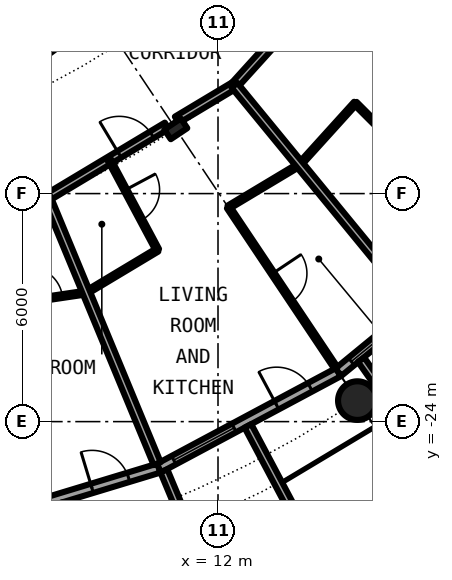
"""IFC4 building model, lengths in metres.
Left out: names, types, materials, properties, quantities, classifications, styles, units other than length and angle.
Written with IfcOpenShell. Run it as: python <this file> out.ifc"""

import sys

from ifc_helpers import new_model, si_unit, direction, frame, frame_2d, origin, origin_2d, place, context, subcontext, project, spatial, rectangle, hollow_circle, i_section, extrude, element, fill, save


model = new_model("IFC4")
c1 = context("Model", 3, precision=1e-05, world=origin(), true_north=direction((0.0, 1.0)))
c2 = subcontext(c1, "Body", "Model", "MODEL_VIEW")
j1 = project(units=[si_unit("LENGTHUNIT", "METRE"), si_unit("PLANEANGLEUNIT", "RADIAN")], contexts=[c1])
p1 = place(None, origin())
s1 = spatial("IfcSite", under=j1, at=p1, CompositionType="ELEMENT")
p2 = place(p1, origin())
s2 = spatial("IfcBuilding", under=s1, at=p2, CompositionType="ELEMENT")
p3 = place(p2, frame((0.0, 0.0, 75.8)))
s3 = spatial("IfcBuildingStorey", under=s2, at=p3, CompositionType="ELEMENT", Elevation=75.8)
p4 = place(p3, frame((15.667, -23.448, 0.0), z_axis=(0.0, 0.0, 1.0), x_axis=(1.0, 0.0, 0.0)))
e1 = element("IfcColumn", 1, at=p4, inside=s3, PredefinedType="COLUMN", context=c2, shape_type="SweptSolid", body=[
    extrude(hollow_circle(Radius=0.508, WallThickness=0.04, at=origin_2d()), origin(), (0.0, 0.0, 1.0), 3.05),
])
p5 = place(p3, frame((10.889, -16.297, 0.0), z_axis=(0.0, 0.0, 1.0), x_axis=(0.55557023302, -0.831469612303, 0.0)))
e2 = element("IfcColumn", 2, at=p5, inside=s3, PredefinedType="COLUMN", context=c2, shape_type="SweptSolid", body=[
    extrude(i_section(OverallWidth=0.306, OverallDepth=0.524, WebThickness=0.021, FlangeThickness=0.04, FilletRadius=0.027, at=origin_2d()), origin(), (0.0, 0.0, 1.0), 3.05),
])
p6 = place(p3, frame((5.326, -26.775, 0.0), z_axis=(0.0, 0.0, 1.0), x_axis=(0.956965678721, 0.290201119486, 0.0)))
e3 = element("IfcWall", 3, at=p6, inside=s3, PredefinedType="SOLIDWALL", context=c2, shape_type="SweptSolid", body=[
    extrude(rectangle(XDim=5.351, YDim=0.25, at=frame_2d((2.676, 0.0))), origin(), (0.0, 0.0, 1.0), 2.7),
])
p7 = place(p6, frame((0.441, 0.0, 0.3)))
e4 = element("IfcOpeningElement", 4, at=p7, cuts=e3, PredefinedType="OPENING", context=c2, shape_type="SweptSolid", body=[
    extrude(rectangle(XDim=1.8, YDim=2.1, at=frame_2d((0.9, 1.05))), frame((0.0, 0.135, 0.0), z_axis=(0.0, -1.0, 0.0), x_axis=(1.0, 0.0, 0.0)), (0.0, 0.0, 1.0), 0.27),
])
p8 = place(p6, frame((3.51, 0.0, 0.0)))
e5 = element("IfcOpeningElement", 5, at=p8, cuts=e3, PredefinedType="OPENING", context=c2, shape_type="SweptSolid", body=[
    extrude(rectangle(XDim=1.0, YDim=2.2, at=frame_2d((0.5, 1.1))), frame((0.0, 0.135, 0.0), z_axis=(0.0, -1.0, 0.0), x_axis=(1.0, 0.0, 0.0)), (0.0, 0.0, 1.0), 0.27),
])
p9 = place(p3, frame((10.447, -25.222, 0.0), z_axis=(0.0, 0.0, 1.0), x_axis=(0.881915646801, 0.471407246368, 0.0)))
e6 = element("IfcWall", 6, at=p9, inside=s3, PredefinedType="SOLIDWALL", context=c2, shape_type="SweptSolid", body=[
    extrude(rectangle(XDim=5.352, YDim=0.25, at=frame_2d((2.676, 0.0))), origin(), (0.0, 0.0, 1.0), 2.7),
])
p10 = place(p9, frame((0.441, 0.0, 0.3)))
e7 = element("IfcOpeningElement", 7, at=p10, cuts=e6, PredefinedType="OPENING", context=c2, shape_type="SweptSolid", body=[
    extrude(rectangle(XDim=1.8, YDim=2.1, at=frame_2d((0.9, 1.05))), frame((0.0, 0.135, 0.0), z_axis=(0.0, -1.0, 0.0), x_axis=(1.0, 0.0, 0.0)), (0.0, 0.0, 1.0), 0.27),
])
p11 = place(p9, frame((3.51, 0.0, 0.0)))
e8 = element("IfcOpeningElement", 8, at=p11, cuts=e6, PredefinedType="OPENING", context=c2, shape_type="SweptSolid", body=[
    extrude(rectangle(XDim=1.0, YDim=2.2, at=frame_2d((0.5, 1.1))), frame((0.0, 0.135, 0.0), z_axis=(0.0, -1.0, 0.0), x_axis=(1.0, 0.0, 0.0)), (0.0, 0.0, 1.0), 0.27),
])
p12 = place(p3, frame((10.575, -25.295, -0.03), z_axis=(0.0, 0.0, 1.0), x_axis=(0.385697364644, -0.922625353492, 0.0)))
e9 = element("IfcWall", 9, at=p12, inside=s3, PredefinedType="SOLIDWALL", context=c2, shape_type="SweptSolid", body=[
    extrude(rectangle(XDim=2.883, YDim=0.2, at=frame_2d((1.442, 0.0))), origin(), (0.0, 0.0, 1.0), 2.73),
])
p13 = place(p3, frame((12.787, -24.113, -0.03), z_axis=(0.0, 0.0, 1.0), x_axis=(0.468365282436, -0.883534924159, 0.0)))
e10 = element("IfcWall", 10, at=p13, inside=s3, PredefinedType="SOLIDWALL", context=c2, shape_type="SweptSolid", body=[
    extrude(rectangle(XDim=3.006, YDim=0.2, at=frame_2d((1.503, 0.0))), origin(), (0.0, 0.0, 1.0), 2.73),
])
p14 = place(p3, frame((15.167, -22.699, 0.0), z_axis=(0.0, 0.0, 1.0), x_axis=(0.773019449054, 0.634382322723, 0.0)))
e11 = element("IfcWall", 11, at=p14, inside=s3, PredefinedType="SOLIDWALL", context=c2, shape_type="SweptSolid", body=[
    extrude(rectangle(XDim=5.352, YDim=0.25, at=frame_2d((2.676, 0.0))), origin(), (0.0, 0.0, 1.0), 2.7),
])
p15 = place(p14, frame((0.441, 0.0, 0.3)))
e12 = element("IfcOpeningElement", 12, at=p15, cuts=e11, PredefinedType="OPENING", context=c2, shape_type="SweptSolid", body=[
    extrude(rectangle(XDim=1.8, YDim=2.1, at=frame_2d((0.9, 1.05))), frame((0.0, 0.135, 0.0), z_axis=(0.0, -1.0, 0.0), x_axis=(1.0, 0.0, 0.0)), (0.0, 0.0, 1.0), 0.27),
])
p16 = place(p14, frame((3.51, 0.0, 0.0)))
e13 = element("IfcOpeningElement", 13, at=p16, cuts=e11, PredefinedType="OPENING", context=c2, shape_type="SweptSolid", body=[
    extrude(rectangle(XDim=1.0, YDim=2.2, at=frame_2d((0.5, 1.1))), frame((0.0, 0.135, 0.0), z_axis=(0.0, -1.0, 0.0), x_axis=(1.0, 0.0, 0.0)), (0.0, 0.0, 1.0), 0.27),
])
p17 = place(p3, frame((15.765, -22.37, -0.03), z_axis=(0.0, 0.0, 1.0), x_axis=(0.576274612209, -0.817256123454, 0.0)))
e14 = element("IfcWall", 14, at=p17, inside=s3, PredefinedType="SOLIDWALL", context=c2, shape_type="SweptSolid", body=[
    extrude(rectangle(XDim=2.933, YDim=0.2, at=frame_2d((1.466, 0.0))), origin(), (0.0, 0.0, 1.0), 2.73),
])
for number, where, z_axis, x_axis in (
    (15, (8.534, -20.604, 0.0), (0.0, 0.0, 1.0), (0.858, 0.514, 0.0)),
    (16, (12.276, -18.36, 0.0), (0.0, 0.0, 1.0), (0.858, 0.514, 0.0)),
):
    element("IfcWall", number, at=place(p3, frame(where, z_axis=z_axis, x_axis=x_axis)), inside=s3, PredefinedType="PARTITIONING", context=c2, shape_type="SweptSolid", body=[
        extrude(rectangle(XDim=2.182, YDim=0.1, at=frame_2d((1.091, 0.0))), origin(), (0.0, 0.0, 1.0), 2.7),
    ])
p18 = place(p3, frame((14.153, -17.234, 0.0), z_axis=(0.0, 0.0, 1.0), x_axis=(0.671144831591, 0.741326254107, 0.0)))
e17 = element("IfcWall", 17, at=p18, inside=s3, PredefinedType="PARTITIONING", context=c2, shape_type="SweptSolid", body=[
    extrude(rectangle(XDim=2.181, YDim=0.1, at=frame_2d((1.091, 0.0))), origin(), (0.0, 0.0, 1.0), 2.7),
])
p19 = place(p3, frame((4.246, -21.239, 0.0), z_axis=(0.0, 0.0, 1.0), x_axis=(0.989178348771, 0.146718077695, 0.0)))
e18 = element("IfcWall", 18, at=p19, inside=s3, PredefinedType="PARTITIONING", context=c2, shape_type="SweptSolid", body=[
    extrude(rectangle(XDim=4.335, YDim=0.1, at=frame_2d((2.167, 0.0))), origin(), (0.0, 0.0, 1.0), 2.7),
])
p20 = place(p19, frame((2.801, 0.0, 0.0)))
e19 = element("IfcOpeningElement", 19, at=p20, cuts=e18, PredefinedType="OPENING", context=c2, shape_type="SweptSolid", body=[
    extrude(rectangle(XDim=0.9, YDim=2.3, at=frame_2d((0.45, 1.15))), frame((0.0, 0.06, 0.0), z_axis=(0.0, -1.0, 0.0), x_axis=(1.0, 0.0, 0.0)), (0.0, 0.0, 1.0), 0.12),
])
p21 = place(p3, frame((7.495, -18.111, 0.0), z_axis=(0.0, 0.0, 1.0), x_axis=(0.857697633371, 0.514154422046, 0.0)))
e20 = element("IfcWall", 20, at=p21, inside=s3, PredefinedType="PARTITIONING", context=c2, shape_type="SweptSolid", body=[
    extrude(rectangle(XDim=3.682, YDim=0.2, at=frame_2d((1.841, 0.0))), origin(), (0.0, 0.0, 1.0), 2.38),
])
p22 = place(p21, frame((2.224, 0.0, 0.0)))
e21 = element("IfcOpeningElement", 21, at=p22, cuts=e20, PredefinedType="OPENING", context=c2, shape_type="SweptSolid", body=[
    extrude(rectangle(XDim=1.0, YDim=2.3, at=frame_2d((0.5, 1.15))), frame((0.0, 0.11, 0.0), z_axis=(0.0, -1.0, 0.0), x_axis=(1.0, 0.0, 0.0)), (0.0, 0.0, 1.0), 0.22),
])
p23 = place(p3, frame((10.916, -16.061, 0.0), z_axis=(0.0, 0.0, 1.0), x_axis=(0.857663265693, 0.514211748875, 0.0)))
e22 = element("IfcWall", 22, at=p23, inside=s3, PredefinedType="PARTITIONING", context=c2, shape_type="SweptSolid", body=[
    extrude(rectangle(XDim=1.77, YDim=0.2, at=frame_2d((0.885, 0.0))), origin(), (0.0, 0.0, 1.0), 2.38),
])
p24 = place(p3, frame((12.434, -15.151, 0.0), z_axis=(0.0, 0.0, 1.0), x_axis=(0.671601747072, 0.740912338492, 0.0)))
e23 = element("IfcWall", 23, at=p24, inside=s3, PredefinedType="PARTITIONING", context=c2, shape_type="SweptSolid", body=[
    extrude(rectangle(XDim=5.597, YDim=0.2, at=frame_2d((2.799, 0.0))), origin(), (0.0, 0.0, 1.0), 2.38),
])
p25 = place(p24, frame((1.417, 0.0, 0.0)))
e24 = element("IfcOpeningElement", 24, at=p25, cuts=e23, PredefinedType="OPENING", context=c2, shape_type="SweptSolid", body=[
    extrude(rectangle(XDim=1.0, YDim=2.3, at=frame_2d((0.5, 1.15))), frame((0.0, 0.11, 0.0), z_axis=(0.0, -1.0, 0.0), x_axis=(1.0, 0.0, 0.0)), (0.0, 0.0, 1.0), 0.22),
])
p26 = place(p3, frame((4.906, -16.172, 0.0), z_axis=(0.0, 0.0, 1.0), x_axis=(0.803191461888, 0.595720971219, 0.0)))
e25 = element("IfcWall", 25, at=p26, inside=s3, PredefinedType="PARTITIONING", context=c2, shape_type="SweptSolid", body=[
    extrude(rectangle(XDim=9.76, YDim=0.2, at=frame_2d((4.88, 0.0))), origin(), (0.0, 0.0, 1.0), 2.7),
])
p27 = place(p26, frame((4.38, 0.0, 0.0)))
e26 = element("IfcOpeningElement", 26, at=p27, cuts=e25, PredefinedType="OPENING", context=c2, shape_type="SweptSolid", body=[
    extrude(rectangle(XDim=1.0, YDim=2.3, at=frame_2d((0.5, 1.15))), frame((0.0, 0.11, 0.0), z_axis=(0.0, -1.0, 0.0), x_axis=(1.0, 0.0, 0.0)), (0.0, 0.0, 1.0), 0.22),
])
p28 = place(p3, frame((7.501, -18.108, 0.0), z_axis=(0.0, 0.0, 1.0), x_axis=(0.382600411313, -0.923913916587, 0.0)))
e27 = element("IfcWall", 27, at=p28, inside=s3, PredefinedType="PARTITIONING", context=c2, shape_type="SweptSolid", body=[
    extrude(rectangle(XDim=7.574, YDim=0.2, at=frame_2d((3.787, 0.0))), origin(), (0.0, 0.0, 1.0), 2.7),
])
p29 = place(p3, frame((9.145, -17.122, 0.0), z_axis=(0.0, 0.0, 1.0), x_axis=(0.471151994359, -0.882052038267, 0.0)))
e28 = element("IfcWall", 28, at=p29, inside=s3, PredefinedType="PARTITIONING", context=c2, shape_type="SweptSolid", body=[
    extrude(rectangle(XDim=2.674, YDim=0.1, at=frame_2d((1.337, 0.0))), origin(), (0.0, 0.0, 1.0), 2.7),
])
p30 = place(p29, frame((0.887, 0.0, 0.0)))
e29 = element("IfcOpeningElement", 29, at=p30, cuts=e28, PredefinedType="OPENING", context=c2, shape_type="SweptSolid", body=[
    extrude(rectangle(XDim=0.9, YDim=2.3, at=frame_2d((0.45, 1.15))), frame((0.0, 0.06, 0.0), z_axis=(0.0, -1.0, 0.0), x_axis=(1.0, 0.0, 0.0)), (0.0, 0.0, 1.0), 0.12),
])
p31 = place(p3, frame((12.276, -18.36, 0.0), z_axis=(0.0, 0.0, 1.0), x_axis=(0.555939561221, -0.831222716406, 0.0)))
e30 = element("IfcWall", 30, at=p31, inside=s3, PredefinedType="PARTITIONING", context=c2, shape_type="SweptSolid", body=[
    extrude(rectangle(XDim=5.089, YDim=0.1, at=frame_2d((2.544, 0.0))), origin(), (0.0, 0.0, 1.0), 2.7),
])
p32 = place(p31, frame((2.094, 0.0, 0.0)))
e31 = element("IfcOpeningElement", 31, at=p32, cuts=e30, PredefinedType="OPENING", context=c2, shape_type="SweptSolid", body=[
    extrude(rectangle(XDim=0.9, YDim=2.3, at=frame_2d((0.45, 1.15))), frame((0.0, 0.06, 0.0), z_axis=(0.0, -1.0, 0.0), x_axis=(1.0, 0.0, 0.0)), (0.0, 0.0, 1.0), 0.12),
])
p33 = place(p3, frame((12.434, -15.151, 0.0), z_axis=(0.0, 0.0, 1.0), x_axis=(0.634381303318, -0.773020285633, 0.0)))
e32 = element("IfcWall", 32, at=p33, inside=s3, PredefinedType="PARTITIONING", context=c2, shape_type="SweptSolid", body=[
    extrude(rectangle(XDim=7.576, YDim=0.2, at=frame_2d((3.788, 0.0))), origin(), (0.0, 0.0, 1.0), 2.7),
])
p34 = place(p3, frame((15.612, -15.622, 0.0), z_axis=(0.0, 0.0, 1.0), x_axis=(0.706914880313, -0.707298629994, 0.0)))
e33 = element("IfcWall", 33, at=p34, inside=s3, PredefinedType="PARTITIONING", context=c2, shape_type="SweptSolid", body=[
    extrude(rectangle(XDim=5.09, YDim=0.1, at=frame_2d((2.545, 0.0))), origin(), (0.0, 0.0, 1.0), 2.7),
])
p35 = place(p34, frame((2.095, 0.0, 0.0)))
e34 = element("IfcOpeningElement", 34, at=p35, cuts=e33, PredefinedType="OPENING", context=c2, shape_type="SweptSolid", body=[
    extrude(rectangle(XDim=0.9, YDim=2.3, at=frame_2d((0.45, 1.15))), frame((0.0, 0.06, 0.0), z_axis=(0.0, -1.0, 0.0), x_axis=(1.0, 0.0, 0.0)), (0.0, 0.0, 1.0), 0.12),
])
p36 = place(p8, origin())
e35 = element("IfcDoor", 35, at=p36, inside=s3, OperationType="SINGLE_SWING_LEFT", PredefinedType="DOOR", context=c2, shape_type="SweptSolid", body=[
    extrude(rectangle(XDim=1.0, YDim=2.2, at=frame_2d((0.5, 1.1))), frame((0.0, 0.025, 0.0), z_axis=(0.0, -1.0, 0.0), x_axis=(1.0, 0.0, 0.0)), (0.0, 0.0, 1.0), 0.05),
])
fill(e5, e35)
p37 = place(p10, origin())
e36 = element("IfcWindow", 36, at=p37, inside=s3, PartitioningType="SINGLE_PANEL", PredefinedType="WINDOW", context=c2, shape_type="SweptSolid", body=[
    extrude(rectangle(XDim=1.8, YDim=2.1, at=frame_2d((0.9, 1.05))), frame((0.0, 0.03, 0.0), z_axis=(0.0, -1.0, 0.0), x_axis=(1.0, 0.0, 0.0)), (0.0, 0.0, 1.0), 0.06),
])
fill(e7, e36)
p38 = place(p11, origin())
e37 = element("IfcDoor", 37, at=p38, inside=s3, OperationType="SINGLE_SWING_LEFT", PredefinedType="DOOR", context=c2, shape_type="SweptSolid", body=[
    extrude(rectangle(XDim=1.0, YDim=2.2, at=frame_2d((0.5, 1.1))), frame((0.0, 0.025, 0.0), z_axis=(0.0, -1.0, 0.0), x_axis=(1.0, 0.0, 0.0)), (0.0, 0.0, 1.0), 0.05),
])
fill(e8, e37)
p39 = place(p15, origin())
e38 = element("IfcWindow", 38, at=p39, inside=s3, PartitioningType="SINGLE_PANEL", PredefinedType="WINDOW", context=c2, shape_type="SweptSolid", body=[
    extrude(rectangle(XDim=1.8, YDim=2.1, at=frame_2d((0.9, 1.05))), frame((0.0, 0.03, 0.0), z_axis=(0.0, -1.0, 0.0), x_axis=(1.0, 0.0, 0.0)), (0.0, 0.0, 1.0), 0.06),
])
fill(e12, e38)
p40 = place(p20, origin())
e39 = element("IfcDoor", 39, at=p40, inside=s3, OperationType="SINGLE_SWING_RIGHT", PredefinedType="DOOR", context=c2, shape_type="SweptSolid", body=[
    extrude(rectangle(XDim=0.9, YDim=2.3, at=frame_2d((0.45, 1.15))), frame((0.0, 0.025, 0.0), z_axis=(0.0, -1.0, 0.0), x_axis=(1.0, 0.0, 0.0)), (0.0, 0.0, 1.0), 0.05),
])
fill(e19, e39)
p41 = place(p22, origin())
e40 = element("IfcDoor", 40, at=p41, inside=s3, OperationType="SINGLE_SWING_RIGHT", PredefinedType="DOOR", context=c2, shape_type="SweptSolid", body=[
    extrude(rectangle(XDim=1.0, YDim=2.3, at=frame_2d((0.5, 1.15))), frame((0.0, 0.025, 0.0), z_axis=(0.0, -1.0, 0.0), x_axis=(1.0, 0.0, 0.0)), (0.0, 0.0, 1.0), 0.05),
])
fill(e21, e40)
p42 = place(p30, origin())
e41 = element("IfcDoor", 41, at=p42, inside=s3, OperationType="SINGLE_SWING_RIGHT", PredefinedType="DOOR", context=c2, shape_type="SweptSolid", body=[
    extrude(rectangle(XDim=0.9, YDim=2.3, at=frame_2d((0.45, 1.15))), frame((0.0, 0.025, 0.0), z_axis=(0.0, -1.0, 0.0), x_axis=(1.0, 0.0, 0.0)), (0.0, 0.0, 1.0), 0.05),
])
fill(e29, e41)
p43 = place(p32, origin())
e42 = element("IfcDoor", 42, at=p43, inside=s3, OperationType="SINGLE_SWING_RIGHT", PredefinedType="DOOR", context=c2, shape_type="SweptSolid", body=[
    extrude(rectangle(XDim=0.9, YDim=2.3, at=frame_2d((0.45, 1.15))), frame((0.0, 0.025, 0.0), z_axis=(0.0, -1.0, 0.0), x_axis=(1.0, 0.0, 0.0)), (0.0, 0.0, 1.0), 0.05),
])
fill(e31, e42)
save(model, sys.argv[1])
